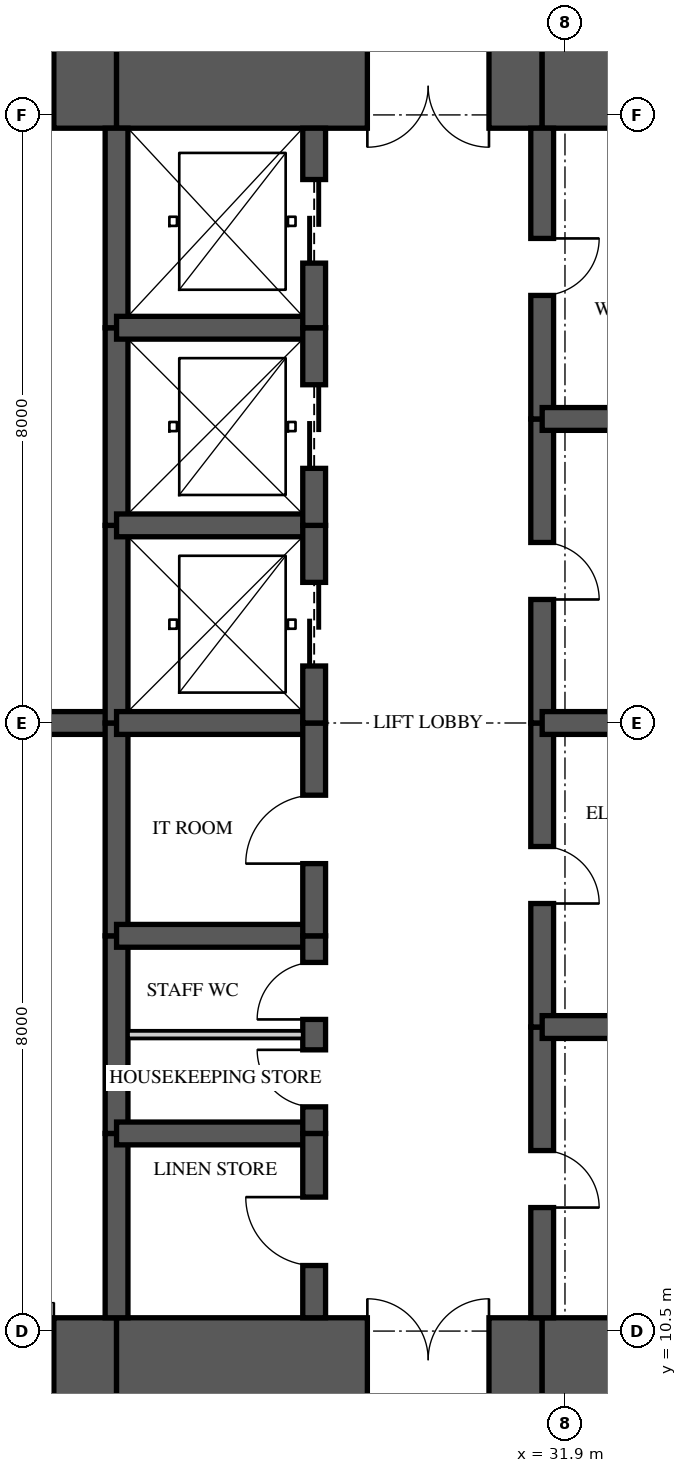
"""IFC4 building model, lengths in metres.
Left out: names, types, materials, properties, quantities, classifications, styles, units other than length and angle.
Written with IfcOpenShell. Run it as: python <this file> out.ifc"""

import sys

from ifc_helpers import new_model, si_unit, direction, frame, frame_2d, origin, place, context, subcontext, project, spatial, rectangle, extrude, element, fill, save


model = new_model("IFC4")
c1 = context("Model", 3, precision=1e-05, world=origin(), true_north=direction((0.0, 1.0)))
c2 = subcontext(c1, "Body", "Model", "MODEL_VIEW")
j1 = project(units=[si_unit("LENGTHUNIT", "METRE"), si_unit("PLANEANGLEUNIT", "RADIAN")], contexts=[c1])
p1 = place(None, origin())
s1 = spatial("IfcSite", under=j1, at=p1, CompositionType="ELEMENT")
p2 = place(p1, origin())
s2 = spatial("IfcBuilding", under=s1, at=p2, CompositionType="ELEMENT")
p3 = place(p2, frame((0.0, 0.0, 242.45)))
s3 = spatial("IfcBuildingStorey", under=s2, at=p3, CompositionType="ELEMENT", Elevation=242.45)
p4 = place(p3, frame((19.725, 10.125, 0.0), z_axis=(0.0, 0.0, 1.0), x_axis=(1.0, 0.0, 0.0)))
e1 = element("IfcWall", 1, at=p4, inside=s3, PredefinedType="SHEAR", context=c2, shape_type="SweptSolid", body=[
    extrude(rectangle(XDim=6.275, YDim=1.1, at=frame_2d((3.137, 0.0))), origin(), (0.0, 0.0, 1.0), 3.5),
])
p5 = place(p4, frame((4.7, 0.0, 0.0)))
e2 = element("IfcOpeningElement", 2, at=p5, cuts=e1, PredefinedType="OPENING", context=c2, shape_type="SweptSolid", body=[
    extrude(rectangle(XDim=0.75, YDim=2.1, at=frame_2d((0.375, 1.05))), frame((0.0, 0.56, 0.0), z_axis=(0.0, -1.0, 0.0), x_axis=(1.0, 0.0, 0.0)), (0.0, 0.0, 1.0), 1.12),
])
p6 = place(p3, frame((26.0, 10.125, 0.0), z_axis=(0.0, 0.0, 1.0), x_axis=(1.0, 0.0, 0.0)))
e3 = element("IfcWall", 3, at=p6, inside=s3, PredefinedType="SHEAR", context=c2, shape_type="SweptSolid", body=[
    extrude(rectangle(XDim=5.6, YDim=1.1, at=frame_2d((2.8, 0.0))), origin(), (0.0, 0.0, 1.0), 3.5),
])
p7 = place(p6, frame((3.3, 0.0, 0.0)))
e4 = element("IfcOpeningElement", 4, at=p7, cuts=e3, PredefinedType="OPENING", context=c2, shape_type="SweptSolid", body=[
    extrude(rectangle(XDim=1.6, YDim=2.1, at=frame_2d((0.8, 1.05))), frame((0.0, 0.56, 0.0), z_axis=(0.0, -1.0, 0.0), x_axis=(1.0, 0.0, 0.0)), (0.0, 0.0, 1.0), 1.12),
])
for number, where, z_axis, x_axis in (
    (5, (31.6, 10.125, 0.0), (0.0, 0.0, 1.0), (1.0, 0.0, 0.0)),
    (6, (35.9, 26.875, 0.0), (0.0, 0.0, 1.0), (-1.0, 0.0, 0.0)),
):
    element("IfcWall", number, at=place(p3, frame(where, z_axis=z_axis, x_axis=x_axis)), inside=s3, PredefinedType="SHEAR", context=c2, shape_type="SweptSolid", body=[
        extrude(rectangle(XDim=4.3, YDim=1.1, at=frame_2d((2.15, 0.0))), origin(), (0.0, 0.0, 1.0), 3.5),
    ])
p8 = place(p3, frame((31.6, 26.875, 0.0), z_axis=(0.0, 0.0, 1.0), x_axis=(-1.0, 0.0, 0.0)))
e7 = element("IfcWall", 7, at=p8, inside=s3, PredefinedType="SHEAR", context=c2, shape_type="SweptSolid", body=[
    extrude(rectangle(XDim=5.6, YDim=1.1, at=frame_2d((2.8, 0.0))), origin(), (0.0, 0.0, 1.0), 3.5),
])
p9 = place(p8, frame((0.7, 0.0, 0.0)))
e8 = element("IfcOpeningElement", 8, at=p9, cuts=e7, PredefinedType="OPENING", context=c2, shape_type="SweptSolid", body=[
    extrude(rectangle(XDim=1.6, YDim=2.1, at=frame_2d((0.8, 1.05))), frame((0.0, 0.56, 0.0), z_axis=(0.0, -1.0, 0.0), x_axis=(1.0, 0.0, 0.0)), (0.0, 0.0, 1.0), 1.12),
])
p10 = place(p3, frame((26.0, 26.875, 0.0), z_axis=(0.0, 0.0, 1.0), x_axis=(-1.0, 0.0, 0.0)))
e9 = element("IfcWall", 9, at=p10, inside=s3, PredefinedType="SHEAR", context=c2, shape_type="SweptSolid", body=[
    extrude(rectangle(XDim=6.275, YDim=1.1, at=frame_2d((3.137, 0.0))), origin(), (0.0, 0.0, 1.0), 3.5),
])
p11 = place(p10, frame((0.825, 0.0, 0.0)))
e10 = element("IfcOpeningElement", 10, at=p11, cuts=e9, PredefinedType="OPENING", context=c2, shape_type="SweptSolid", body=[
    extrude(rectangle(XDim=0.75, YDim=2.1, at=frame_2d((0.375, 1.05))), frame((0.0, 0.56, 0.0), z_axis=(0.0, -1.0, 0.0), x_axis=(1.0, 0.0, 0.0)), (0.0, 0.0, 1.0), 1.12),
])
p12 = place(p3, frame((26.0, 10.675, 0.0), z_axis=(0.0, 0.0, 1.0), x_axis=(0.0, 1.0, 0.0)))
e11 = element("IfcWall", 11, at=p12, inside=s3, PredefinedType="SHEAR", context=c2, shape_type="SweptSolid", body=[
    extrude(rectangle(XDim=2.425, YDim=0.3, at=frame_2d((1.212, 0.0))), origin(), (0.0, 0.0, 1.0), 3.5),
])
p13 = place(p3, frame((26.0, 13.1, 0.0), z_axis=(0.0, 0.0, 1.0), x_axis=(0.0, 1.0, 0.0)))
e12 = element("IfcWall", 12, at=p13, inside=s3, PredefinedType="SHEAR", context=c2, shape_type="SweptSolid", body=[
    extrude(rectangle(XDim=2.6, YDim=0.3, at=frame_2d((1.3, 0.0))), origin(), (0.0, 0.0, 1.0), 3.5),
])
p14 = place(p3, frame((26.0, 15.7, 0.0), z_axis=(0.0, 0.0, 1.0), x_axis=(0.0, 1.0, 0.0)))
e13 = element("IfcWall", 13, at=p14, inside=s3, PredefinedType="SHEAR", context=c2, shape_type="SweptSolid", body=[
    extrude(rectangle(XDim=2.8, YDim=0.3, at=frame_2d((1.4, 0.0))), origin(), (0.0, 0.0, 1.0), 3.5),
])
p15 = place(p3, frame((26.0, 18.5, 0.0), z_axis=(0.0, 0.0, 1.0), x_axis=(0.0, 1.0, 0.0)))
e14 = element("IfcWall", 14, at=p15, inside=s3, PredefinedType="SHEAR", context=c2, shape_type="SweptSolid", body=[
    extrude(rectangle(XDim=2.6, YDim=0.3, at=frame_2d((1.3, 0.0))), origin(), (0.0, 0.0, 1.0), 3.5),
])
p16 = place(p3, frame((26.0, 21.1, 0.0), z_axis=(0.0, 0.0, 1.0), x_axis=(0.0, 1.0, 0.0)))
e15 = element("IfcWall", 15, at=p16, inside=s3, PredefinedType="SHEAR", context=c2, shape_type="SweptSolid", body=[
    extrude(rectangle(XDim=2.6, YDim=0.3, at=frame_2d((1.3, 0.0))), origin(), (0.0, 0.0, 1.0), 3.5),
])
p17 = place(p3, frame((26.0, 23.7, 0.0), z_axis=(0.0, 0.0, 1.0), x_axis=(0.0, 1.0, 0.0)))
e16 = element("IfcWall", 16, at=p17, inside=s3, PredefinedType="SHEAR", context=c2, shape_type="SweptSolid", body=[
    extrude(rectangle(XDim=2.625, YDim=0.3, at=frame_2d((1.312, 0.0))), origin(), (0.0, 0.0, 1.0), 3.5),
])
p18 = place(p3, frame((28.6, 10.675, 0.0), z_axis=(0.0, 0.0, 1.0), x_axis=(0.0, 1.0, 0.0)))
e17 = element("IfcWall", 17, at=p18, inside=s3, PredefinedType="SHEAR", context=c2, shape_type="SweptSolid", body=[
    extrude(rectangle(XDim=2.425, YDim=0.3, at=frame_2d((1.212, 0.0))), origin(), (0.0, 0.0, 1.0), 3.5),
])
p19 = place(p18, frame((0.688, 0.0, 0.0)))
e18 = element("IfcOpeningElement", 18, at=p19, cuts=e17, PredefinedType="OPENING", context=c2, shape_type="SweptSolid", body=[
    extrude(rectangle(XDim=0.9, YDim=2.1, at=frame_2d((0.45, 1.05))), frame((0.0, 0.16, 0.0), z_axis=(0.0, -1.0, 0.0), x_axis=(1.0, 0.0, 0.0)), (0.0, 0.0, 1.0), 0.32),
])
p20 = place(p3, frame((28.6, 13.1, 0.0), z_axis=(0.0, 0.0, 1.0), x_axis=(0.0, 1.0, 0.0)))
e19 = element("IfcWall", 19, at=p20, inside=s3, PredefinedType="SHEAR", context=c2, shape_type="SweptSolid", body=[
    extrude(rectangle(XDim=2.6, YDim=0.3, at=frame_2d((1.3, 0.0))), origin(), (0.0, 0.0, 1.0), 3.5),
])
p21 = place(p20, frame((0.35, 0.0, 0.0)))
e20 = element("IfcOpeningElement", 20, at=p21, cuts=e19, PredefinedType="OPENING", context=c2, shape_type="SweptSolid", body=[
    extrude(rectangle(XDim=0.75, YDim=2.1, at=frame_2d((0.375, 1.05))), frame((0.0, 0.16, 0.0), z_axis=(0.0, -1.0, 0.0), x_axis=(1.0, 0.0, 0.0)), (0.0, 0.0, 1.0), 0.32),
])
p22 = place(p20, frame((1.5, 0.0, 0.0)))
e21 = element("IfcOpeningElement", 21, at=p22, cuts=e19, PredefinedType="OPENING", context=c2, shape_type="SweptSolid", body=[
    extrude(rectangle(XDim=0.75, YDim=2.1, at=frame_2d((0.375, 1.05))), frame((0.0, 0.16, 0.0), z_axis=(0.0, -1.0, 0.0), x_axis=(1.0, 0.0, 0.0)), (0.0, 0.0, 1.0), 0.32),
])
p23 = place(p3, frame((28.6, 15.7, 0.0), z_axis=(0.0, 0.0, 1.0), x_axis=(0.0, 1.0, 0.0)))
e22 = element("IfcWall", 22, at=p23, inside=s3, PredefinedType="SHEAR", context=c2, shape_type="SweptSolid", body=[
    extrude(rectangle(XDim=2.8, YDim=0.3, at=frame_2d((1.4, 0.0))), origin(), (0.0, 0.0, 1.0), 3.5),
])
p24 = place(p23, frame((0.95, 0.0, 0.0)))
e23 = element("IfcOpeningElement", 23, at=p24, cuts=e22, PredefinedType="OPENING", context=c2, shape_type="SweptSolid", body=[
    extrude(rectangle(XDim=0.9, YDim=2.1, at=frame_2d((0.45, 1.05))), frame((0.0, 0.16, 0.0), z_axis=(0.0, -1.0, 0.0), x_axis=(1.0, 0.0, 0.0)), (0.0, 0.0, 1.0), 0.32),
])
p25 = place(p3, frame((28.6, 18.5, 0.0), z_axis=(0.0, 0.0, 1.0), x_axis=(0.0, 1.0, 0.0)))
e24 = element("IfcWall", 24, at=p25, inside=s3, PredefinedType="SHEAR", context=c2, shape_type="SweptSolid", body=[
    extrude(rectangle(XDim=2.6, YDim=0.3, at=frame_2d((1.3, 0.0))), origin(), (0.0, 0.0, 1.0), 3.5),
])
p26 = place(p25, frame((0.75, 0.0, 0.0)))
e25 = element("IfcOpeningElement", 25, at=p26, cuts=e24, PredefinedType="OPENING", context=c2, shape_type="SweptSolid", body=[
    extrude(rectangle(XDim=1.1, YDim=2.1, at=frame_2d((0.55, 1.05))), frame((0.0, 0.16, 0.0), z_axis=(0.0, -1.0, 0.0), x_axis=(1.0, 0.0, 0.0)), (0.0, 0.0, 1.0), 0.32),
])
p27 = place(p3, frame((28.6, 21.1, 0.0), z_axis=(0.0, 0.0, 1.0), x_axis=(0.0, 1.0, 0.0)))
e26 = element("IfcWall", 26, at=p27, inside=s3, PredefinedType="SHEAR", context=c2, shape_type="SweptSolid", body=[
    extrude(rectangle(XDim=2.6, YDim=0.3, at=frame_2d((1.3, 0.0))), origin(), (0.0, 0.0, 1.0), 3.5),
])
p28 = place(p27, frame((0.75, 0.0, 0.0)))
e27 = element("IfcOpeningElement", 27, at=p28, cuts=e26, PredefinedType="OPENING", context=c2, shape_type="SweptSolid", body=[
    extrude(rectangle(XDim=1.1, YDim=2.1, at=frame_2d((0.55, 1.05))), frame((0.0, 0.16, 0.0), z_axis=(0.0, -1.0, 0.0), x_axis=(1.0, 0.0, 0.0)), (0.0, 0.0, 1.0), 0.32),
])
p29 = place(p3, frame((28.6, 23.7, 0.0), z_axis=(0.0, 0.0, 1.0), x_axis=(0.0, 1.0, 0.0)))
e28 = element("IfcWall", 28, at=p29, inside=s3, PredefinedType="SHEAR", context=c2, shape_type="SweptSolid", body=[
    extrude(rectangle(XDim=2.625, YDim=0.3, at=frame_2d((1.312, 0.0))), origin(), (0.0, 0.0, 1.0), 3.5),
])
p30 = place(p29, frame((0.85, 0.0, 0.0)))
e29 = element("IfcOpeningElement", 29, at=p30, cuts=e28, PredefinedType="OPENING", context=c2, shape_type="SweptSolid", body=[
    extrude(rectangle(XDim=1.1, YDim=2.1, at=frame_2d((0.55, 1.05))), frame((0.0, 0.16, 0.0), z_axis=(0.0, -1.0, 0.0), x_axis=(1.0, 0.0, 0.0)), (0.0, 0.0, 1.0), 0.32),
])
p31 = place(p3, frame((31.6, 10.675, 0.0), z_axis=(0.0, 0.0, 1.0), x_axis=(0.0, 1.0, 0.0)))
e30 = element("IfcWall", 30, at=p31, inside=s3, PredefinedType="SHEAR", context=c2, shape_type="SweptSolid", body=[
    extrude(rectangle(XDim=3.825, YDim=0.3, at=frame_2d((1.913, 0.0))), origin(), (0.0, 0.0, 1.0), 3.5),
])
p32 = place(p31, frame((1.45, 0.0, 0.0)))
e31 = element("IfcOpeningElement", 31, at=p32, cuts=e30, PredefinedType="OPENING", context=c2, shape_type="SweptSolid", body=[
    extrude(rectangle(XDim=0.75, YDim=2.1, at=frame_2d((0.375, 1.05))), frame((0.0, 0.16, 0.0), z_axis=(0.0, -1.0, 0.0), x_axis=(1.0, 0.0, 0.0)), (0.0, 0.0, 1.0), 0.32),
])
p33 = place(p3, frame((31.6, 14.5, 0.0), z_axis=(0.0, 0.0, 1.0), x_axis=(0.0, 1.0, 0.0)))
e32 = element("IfcWall", 32, at=p33, inside=s3, PredefinedType="SHEAR", context=c2, shape_type="SweptSolid", body=[
    extrude(rectangle(XDim=4.0, YDim=0.3, at=frame_2d((2.0, 0.0))), origin(), (0.0, 0.0, 1.0), 3.5),
])
p34 = place(p33, frame((1.625, 0.0, 0.0)))
e33 = element("IfcOpeningElement", 33, at=p34, cuts=e32, PredefinedType="OPENING", context=c2, shape_type="SweptSolid", body=[
    extrude(rectangle(XDim=0.75, YDim=2.1, at=frame_2d((0.375, 1.05))), frame((0.0, 0.16, 0.0), z_axis=(0.0, -1.0, 0.0), x_axis=(1.0, 0.0, 0.0)), (0.0, 0.0, 1.0), 0.32),
])
p35 = place(p3, frame((31.6, 18.5, 0.0), z_axis=(0.0, 0.0, 1.0), x_axis=(0.0, 1.0, 0.0)))
e34 = element("IfcWall", 34, at=p35, inside=s3, PredefinedType="SHEAR", context=c2, shape_type="SweptSolid", body=[
    extrude(rectangle(XDim=4.0, YDim=0.3, at=frame_2d((2.0, 0.0))), origin(), (0.0, 0.0, 1.0), 3.5),
])
p36 = place(p35, frame((1.625, 0.0, 0.0)))
e35 = element("IfcOpeningElement", 35, at=p36, cuts=e34, PredefinedType="OPENING", context=c2, shape_type="SweptSolid", body=[
    extrude(rectangle(XDim=0.75, YDim=2.1, at=frame_2d((0.375, 1.05))), frame((0.0, 0.16, 0.0), z_axis=(0.0, -1.0, 0.0), x_axis=(1.0, 0.0, 0.0)), (0.0, 0.0, 1.0), 0.32),
])
p37 = place(p3, frame((31.6, 22.5, 0.0), z_axis=(0.0, 0.0, 1.0), x_axis=(0.0, 1.0, 0.0)))
e36 = element("IfcWall", 36, at=p37, inside=s3, PredefinedType="SHEAR", context=c2, shape_type="SweptSolid", body=[
    extrude(rectangle(XDim=3.825, YDim=0.3, at=frame_2d((1.913, 0.0))), origin(), (0.0, 0.0, 1.0), 3.5),
])
p38 = place(p37, frame((1.625, 0.0, 0.0)))
e37 = element("IfcOpeningElement", 37, at=p38, cuts=e36, PredefinedType="OPENING", context=c2, shape_type="SweptSolid", body=[
    extrude(rectangle(XDim=0.75, YDim=2.1, at=frame_2d((0.375, 1.05))), frame((0.0, 0.16, 0.0), z_axis=(0.0, -1.0, 0.0), x_axis=(1.0, 0.0, 0.0)), (0.0, 0.0, 1.0), 0.32),
])
p39 = place(p3, frame((23.6, 18.5, 0.0), z_axis=(0.0, 0.0, 1.0), x_axis=(1.0, 0.0, 0.0)))
e38 = element("IfcWall", 38, at=p39, inside=s3, PredefinedType="SHEAR", context=c2, shape_type="SweptSolid", body=[
    extrude(rectangle(XDim=2.4, YDim=0.3, at=frame_2d((1.2, 0.0))), origin(), (0.0, 0.0, 1.0), 3.5),
])
for number, where, z_axis, x_axis in (
    (39, (26.0, 13.1, 0.0), (0.0, 0.0, 1.0), (1.0, 0.0, 0.0)),
    (40, (26.0, 15.7, 0.0), (0.0, 0.0, 1.0), (1.0, 0.0, 0.0)),
    (41, (26.0, 18.5, 0.0), (0.0, 0.0, 1.0), (1.0, 0.0, 0.0)),
    (42, (26.0, 21.1, 0.0), (0.0, 0.0, 1.0), (1.0, 0.0, 0.0)),
    (43, (26.0, 23.7, 0.0), (0.0, 0.0, 1.0), (1.0, 0.0, 0.0)),
):
    element("IfcWall", number, at=place(p3, frame(where, z_axis=z_axis, x_axis=x_axis)), inside=s3, PredefinedType="SHEAR", context=c2, shape_type="SweptSolid", body=[
        extrude(rectangle(XDim=2.6, YDim=0.3, at=frame_2d((1.3, 0.0))), origin(), (0.0, 0.0, 1.0), 3.5),
    ])
for number, where, z_axis, x_axis in (
    (44, (31.6, 14.5, 0.0), (0.0, 0.0, 1.0), (1.0, 0.0, 0.0)),
    (45, (31.6, 18.5, 0.0), (0.0, 0.0, 1.0), (1.0, 0.0, 0.0)),
    (46, (31.6, 22.5, 0.0), (0.0, 0.0, 1.0), (1.0, 0.0, 0.0)),
):
    element("IfcWall", number, at=place(p3, frame(where, z_axis=z_axis, x_axis=x_axis)), inside=s3, PredefinedType="SHEAR", context=c2, shape_type="SweptSolid", body=[
        extrude(rectangle(XDim=4.3, YDim=0.3, at=frame_2d((2.15, 0.0))), origin(), (0.0, 0.0, 1.0), 3.5),
    ])
p40 = place(p3, frame((26.15, 14.4, 0.0), z_axis=(0.0, 0.0, 1.0), x_axis=(1.0, 0.0, 0.0)))
e47 = element("IfcWall", 47, at=p40, inside=s3, PredefinedType="PARTITIONING", context=c2, shape_type="SweptSolid", body=[
    extrude(rectangle(XDim=2.3, YDim=0.1, at=frame_2d((1.15, 0.0))), origin(), (0.0, 0.0, 1.0), 3.26),
])
p41 = place(p26, origin())
e48 = element("IfcDoor", 48, at=p41, inside=s3, OperationType="SLIDING_TO_LEFT", PredefinedType="DOOR", context=c2, shape_type="SweptSolid", body=[
    extrude(rectangle(XDim=1.1, YDim=2.1, at=frame_2d((0.55, 1.05))), frame((0.0, 0.025, 0.0), z_axis=(0.0, -1.0, 0.0), x_axis=(1.0, 0.0, 0.0)), (0.0, 0.0, 1.0), 0.05),
])
fill(e25, e48)
p42 = place(p28, origin())
e49 = element("IfcDoor", 49, at=p42, inside=s3, OperationType="SLIDING_TO_LEFT", PredefinedType="DOOR", context=c2, shape_type="SweptSolid", body=[
    extrude(rectangle(XDim=1.1, YDim=2.1, at=frame_2d((0.55, 1.05))), frame((0.0, 0.025, 0.0), z_axis=(0.0, -1.0, 0.0), x_axis=(1.0, 0.0, 0.0)), (0.0, 0.0, 1.0), 0.05),
])
fill(e27, e49)
p43 = place(p30, origin())
e50 = element("IfcDoor", 50, at=p43, inside=s3, OperationType="SLIDING_TO_LEFT", PredefinedType="DOOR", context=c2, shape_type="SweptSolid", body=[
    extrude(rectangle(XDim=1.1, YDim=2.1, at=frame_2d((0.55, 1.05))), frame((0.0, 0.025, 0.0), z_axis=(0.0, -1.0, 0.0), x_axis=(1.0, 0.0, 0.0)), (0.0, 0.0, 1.0), 0.05),
])
fill(e29, e50)
p44 = place(p19, origin())
e51 = element("IfcDoor", 51, at=p44, inside=s3, OperationType="SINGLE_SWING_RIGHT", PredefinedType="DOOR", context=c2, shape_type="SweptSolid", body=[
    extrude(rectangle(XDim=0.9, YDim=2.1, at=frame_2d((0.45, 1.05))), frame((0.0, 0.025, 0.0), z_axis=(0.0, -1.0, 0.0), x_axis=(1.0, 0.0, 0.0)), (0.0, 0.0, 1.0), 0.05),
])
fill(e18, e51)
p45 = place(p21, origin())
e52 = element("IfcDoor", 52, at=p45, inside=s3, OperationType="SINGLE_SWING_RIGHT", PredefinedType="DOOR", context=c2, shape_type="SweptSolid", body=[
    extrude(rectangle(XDim=0.75, YDim=2.1, at=frame_2d((0.375, 1.05))), frame((0.0, 0.025, 0.0), z_axis=(0.0, -1.0, 0.0), x_axis=(1.0, 0.0, 0.0)), (0.0, 0.0, 1.0), 0.05),
])
fill(e20, e52)
p46 = place(p22, origin())
e53 = element("IfcDoor", 53, at=p46, inside=s3, OperationType="SINGLE_SWING_LEFT", PredefinedType="DOOR", context=c2, shape_type="SweptSolid", body=[
    extrude(rectangle(XDim=0.75, YDim=2.1, at=frame_2d((0.375, 1.05))), frame((0.0, 0.025, 0.0), z_axis=(0.0, -1.0, 0.0), x_axis=(1.0, 0.0, 0.0)), (0.0, 0.0, 1.0), 0.05),
])
fill(e21, e53)
p47 = place(p24, origin())
e54 = element("IfcDoor", 54, at=p47, inside=s3, OperationType="SINGLE_SWING_LEFT", PredefinedType="DOOR", context=c2, shape_type="SweptSolid", body=[
    extrude(rectangle(XDim=0.9, YDim=2.1, at=frame_2d((0.45, 1.05))), frame((0.0, 0.025, 0.0), z_axis=(0.0, -1.0, 0.0), x_axis=(1.0, 0.0, 0.0)), (0.0, 0.0, 1.0), 0.05),
])
fill(e23, e54)
p48 = place(p7, origin())
e55 = element("IfcDoor", 55, at=p48, inside=s3, OperationType="DOUBLE_DOOR_SINGLE_SWING", PredefinedType="DOOR", context=c2, shape_type="SweptSolid", body=[
    extrude(rectangle(XDim=1.6, YDim=2.1, at=frame_2d((0.8, 1.05))), frame((0.0, 0.025, 0.0), z_axis=(0.0, -1.0, 0.0), x_axis=(1.0, 0.0, 0.0)), (0.0, 0.0, 1.0), 0.05),
])
fill(e4, e55)
p49 = place(p9, origin())
e56 = element("IfcDoor", 56, at=p49, inside=s3, OperationType="DOUBLE_DOOR_SINGLE_SWING", PredefinedType="DOOR", context=c2, shape_type="SweptSolid", body=[
    extrude(rectangle(XDim=1.6, YDim=2.1, at=frame_2d((0.8, 1.05))), frame((0.0, 0.025, 0.0), z_axis=(0.0, -1.0, 0.0), x_axis=(1.0, 0.0, 0.0)), (0.0, 0.0, 1.0), 0.05),
])
fill(e8, e56)
p50 = place(p32, frame((0.75, 0.0, 0.0), z_axis=(0.0, 0.0, 1.0), x_axis=(-1.0, 0.0, 0.0)))
e57 = element("IfcDoor", 57, at=p50, inside=s3, OperationType="SINGLE_SWING_RIGHT", PredefinedType="DOOR", context=c2, shape_type="SweptSolid", body=[
    extrude(rectangle(XDim=0.75, YDim=2.1, at=frame_2d((0.375, 1.05))), frame((0.0, 0.025, 0.0), z_axis=(0.0, -1.0, 0.0), x_axis=(1.0, 0.0, 0.0)), (0.0, 0.0, 1.0), 0.05),
])
fill(e31, e57)
p51 = place(p34, frame((0.75, 0.0, 0.0), z_axis=(0.0, 0.0, 1.0), x_axis=(-1.0, 0.0, 0.0)))
e58 = element("IfcDoor", 58, at=p51, inside=s3, OperationType="SINGLE_SWING_RIGHT", PredefinedType="DOOR", context=c2, shape_type="SweptSolid", body=[
    extrude(rectangle(XDim=0.75, YDim=2.1, at=frame_2d((0.375, 1.05))), frame((0.0, 0.025, 0.0), z_axis=(0.0, -1.0, 0.0), x_axis=(1.0, 0.0, 0.0)), (0.0, 0.0, 1.0), 0.05),
])
fill(e33, e58)
p52 = place(p36, frame((0.75, 0.0, 0.0), z_axis=(0.0, 0.0, 1.0), x_axis=(-1.0, 0.0, 0.0)))
e59 = element("IfcDoor", 59, at=p52, inside=s3, OperationType="SINGLE_SWING_RIGHT", PredefinedType="DOOR", context=c2, shape_type="SweptSolid", body=[
    extrude(rectangle(XDim=0.75, YDim=2.1, at=frame_2d((0.375, 1.05))), frame((0.0, 0.025, 0.0), z_axis=(0.0, -1.0, 0.0), x_axis=(1.0, 0.0, 0.0)), (0.0, 0.0, 1.0), 0.05),
])
fill(e35, e59)
p53 = place(p38, frame((0.75, 0.0, 0.0), z_axis=(0.0, 0.0, 1.0), x_axis=(-1.0, 0.0, 0.0)))
e60 = element("IfcDoor", 60, at=p53, inside=s3, OperationType="SINGLE_SWING_LEFT", PredefinedType="DOOR", context=c2, shape_type="SweptSolid", body=[
    extrude(rectangle(XDim=0.75, YDim=2.1, at=frame_2d((0.375, 1.05))), frame((0.0, 0.025, 0.0), z_axis=(0.0, -1.0, 0.0), x_axis=(1.0, 0.0, 0.0)), (0.0, 0.0, 1.0), 0.05),
])
fill(e37, e60)
p54 = place(p5, origin())
e61 = element("IfcDoor", 61, at=p54, inside=s3, OperationType="SINGLE_SWING_RIGHT", PredefinedType="DOOR", context=c2, shape_type="SweptSolid", body=[
    extrude(rectangle(XDim=0.75, YDim=2.1, at=frame_2d((0.375, 1.05))), frame((0.0, 0.025, 0.0), z_axis=(0.0, -1.0, 0.0), x_axis=(1.0, 0.0, 0.0)), (0.0, 0.0, 1.0), 0.05),
])
fill(e2, e61)
p55 = place(p11, origin())
e62 = element("IfcDoor", 62, at=p55, inside=s3, OperationType="SINGLE_SWING_RIGHT", PredefinedType="DOOR", context=c2, shape_type="SweptSolid", body=[
    extrude(rectangle(XDim=0.75, YDim=2.1, at=frame_2d((0.375, 1.05))), frame((0.0, 0.025, 0.0), z_axis=(0.0, -1.0, 0.0), x_axis=(1.0, 0.0, 0.0)), (0.0, 0.0, 1.0), 0.05),
])
fill(e10, e62)
save(model, sys.argv[1])
